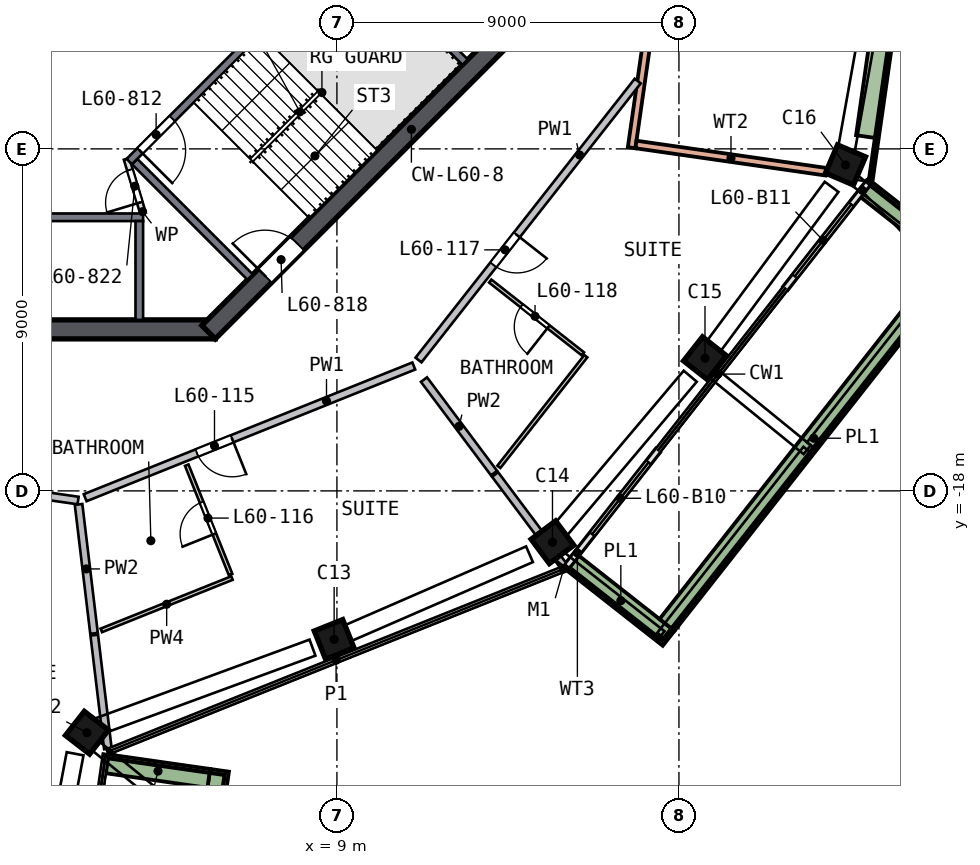
"""IFC4 building model, lengths in metres.
Left out: names, types, materials, properties, quantities, classifications, styles, units other than length and angle.
Written with IfcOpenShell. Run it as: python <this file> out.ifc"""

import sys

from ifc_helpers import new_model, si_unit, direction, frame, frame_2d, origin, origin_2d, place, context, subcontext, project, spatial, rectangle, extrude, element, fill, save


model = new_model("IFC4")
c1 = context("Model", 3, precision=1e-05, world=origin(), true_north=direction((0.0, 1.0)))
c2 = subcontext(c1, "Body", "Model", "MODEL_VIEW")
j1 = project(units=[si_unit("LENGTHUNIT", "METRE"), si_unit("PLANEANGLEUNIT", "RADIAN")], contexts=[c1])
p1 = place(None, origin())
s1 = spatial("IfcSite", under=j1, at=p1, CompositionType="ELEMENT")
p2 = place(p1, origin())
s2 = spatial("IfcBuilding", under=s1, at=p2, CompositionType="ELEMENT")
p3 = place(p2, frame((0.0, 0.0, 244.5)))
s3 = spatial("IfcBuildingStorey", under=s2, at=p3, CompositionType="ELEMENT", Elevation=244.5)
p4 = place(p3, frame((2.283, -24.379, 0.0), z_axis=(0.115845054, 0.011858155, 0.99319651), x_axis=(-0.610285888, -0.788071106, 0.080591978)))
e1 = element("IfcColumn", 1, at=p4, inside=s3, PredefinedType="COLUMN", context=c2, shape_type="SweptSolid", body=[
    extrude(rectangle(XDim=0.8, YDim=0.8, at=origin_2d()), origin(), (0.0, 0.0, 1.0), 3.212),
])
p5 = place(p3, frame((8.801, -21.96, 0.0), z_axis=(0.104110118, 0.042739143, 0.993647044), x_axis=(0.922375739, 0.369538016, -0.11253733)))
e2 = element("IfcColumn", 2, at=p5, inside=s3, PredefinedType="COLUMN", context=c2, shape_type="SweptSolid", body=[
    extrude(rectangle(XDim=0.8, YDim=0.8, at=origin_2d()), origin(), (0.0, 0.0, 1.0), 3.21),
])
p6 = place(p3, frame((14.561, -19.436, 0.0), z_axis=(0.091835145, 0.070016696, 0.993309604), x_axis=(-0.794999833, -0.595516736, 0.11547763)))
e3 = element("IfcColumn", 3, at=p6, inside=s3, PredefinedType="COLUMN", context=c2, shape_type="SweptSolid", body=[
    extrude(rectangle(XDim=0.8, YDim=0.8, at=origin_2d()), origin(), (0.0, 0.0, 1.0), 3.211),
])
p7 = place(p3, frame((18.602, -14.617, 0.0), z_axis=(0.068747968, 0.089052954, 0.993651492), x_axis=(0.613855028, 0.781361755, -0.112498053)))
e4 = element("IfcColumn", 4, at=p7, inside=s3, PredefinedType="COLUMN", context=c2, shape_type="SweptSolid", body=[
    extrude(rectangle(XDim=0.8, YDim=0.8, at=origin_2d()), origin(), (0.0, 0.0, 1.0), 3.21),
])
p8 = place(p3, frame((22.329, -9.552, 0.0), z_axis=(0.044549336, 0.106507884, 0.993313358), x_axis=(-0.391063778, -0.913094462, 0.115445333)))
e5 = element("IfcColumn", 5, at=p8, inside=s3, PredefinedType="COLUMN", context=c2, shape_type="SweptSolid", body=[
    extrude(rectangle(XDim=0.8, YDim=0.8, at=origin_2d()), origin(), (0.0, 0.0, 1.0), 3.211),
])
p9 = place(p3, frame((-5.799, -13.75, 0.0), z_axis=(0.0, 0.0, 1.0), x_axis=(1.0, 0.0, 0.0)))
e6 = element("IfcWall", 6, at=p9, inside=s3, PredefinedType="SHEAR", context=c2, shape_type="SweptSolid", body=[
    extrude(rectangle(XDim=11.598, YDim=0.5, at=frame_2d((5.799, 0.0))), origin(), (0.0, 0.0, 1.0), 3.5),
])
p10 = place(p3, frame((5.622, -13.823, 0.0), z_axis=(0.0, 0.0, 1.0), x_axis=(0.707106781, 0.707106781, 0.0)))
e7 = element("IfcWall", 7, at=p10, inside=s3, PredefinedType="SHEAR", context=c2, shape_type="SweptSolid", body=[
    extrude(rectangle(XDim=11.598, YDim=0.5, at=frame_2d((5.799, 0.0))), origin(), (0.0, 0.0, 1.0), 3.5),
])
p11 = place(p10, frame((2.099, 0.0, 0.0)))
e8 = element("IfcOpeningElement", 8, at=p11, cuts=e7, PredefinedType="OPENING", context=c2, shape_type="SweptSolid", body=[
    extrude(rectangle(XDim=1.2, YDim=2.1, at=frame_2d((0.6, 1.05))), frame((0.0, 0.26, 0.0), z_axis=(0.0, -1.0, 0.0), x_axis=(1.0, 0.0, 0.0)), (0.0, 0.0, 1.0), 0.52),
])
p12 = place(p3, frame((15.061, -19.974, 0.0), z_axis=(0.0, 0.0, 1.0), x_axis=(0.617896909, 0.786259124, 0.0)))
e9 = element("IfcWall", 9, at=p12, inside=s3, PredefinedType="SOLIDWALL", context=c2, shape_type="SweptSolid", body=[
    extrude(rectangle(XDim=3.863, YDim=0.15, at=frame_2d((1.932, 0.0))), origin(), (0.0, 0.0, 1.0), 2.525),
])
p13 = place(p12, frame((1.063, 0.0, 0.0)))
e10 = element("IfcOpeningElement", 10, at=p13, cuts=e9, PredefinedType="OPENING", context=c2, shape_type="SweptSolid", body=[
    extrude(rectangle(XDim=2.4, YDim=2.4, at=frame_2d((1.2, 1.2))), frame((0.0, 0.085, 0.0), z_axis=(0.0, -1.0, 0.0), x_axis=(1.0, 0.0, 0.0)), (0.0, 0.0, 1.0), 0.17),
])
p14 = place(p3, frame((20.804, -12.665, 0.0), z_axis=(0.0, 0.0, 1.0), x_axis=(0.617867182, 0.786282484, 0.0)))
e11 = element("IfcWall", 11, at=p14, inside=s3, PredefinedType="SOLIDWALL", context=c2, shape_type="SweptSolid", body=[
    extrude(rectangle(XDim=3.544, YDim=0.15, at=frame_2d((1.772, 0.0))), origin(), (0.0, 0.0, 1.0), 2.525),
])
p15 = place(p14, frame((0.4, 0.0, 0.0)))
e12 = element("IfcOpeningElement", 12, at=p15, cuts=e11, PredefinedType="OPENING", context=c2, shape_type="SweptSolid", body=[
    extrude(rectangle(XDim=2.4, YDim=2.4, at=frame_2d((1.2, 1.2))), frame((0.0, 0.085, 0.0), z_axis=(0.0, -1.0, 0.0), x_axis=(1.0, 0.0, 0.0)), (0.0, 0.0, 1.0), 0.17),
])
p16 = place(p3, frame((4.504, -35.165, 0.0), z_axis=(0.0, 0.0, 1.0), x_axis=(0.141938642, 0.989875458, 0.0)))
e13 = element("IfcWall", 13, at=p16, inside=s3, PredefinedType="SOLIDWALL", context=c2, shape_type="SweptSolid", body=[
    extrude(rectangle(XDim=9.911, YDim=0.5, at=frame_2d((4.956, 0.0))), origin(), (0.0, 0.0, 1.0), 0.7),
])
p17 = place(p3, frame((5.628, -25.566, 0.0), z_axis=(0.0, 0.0, 1.0), x_axis=(-0.989876998, 0.1419279, 0.0)))
e14 = element("IfcWall", 14, at=p17, inside=s3, PredefinedType="SOLIDWALL", context=c2, shape_type="SweptSolid", body=[
    extrude(rectangle(XDim=2.699, YDim=0.5, at=frame_2d((1.35, 0.0))), origin(), (0.0, 0.0, 1.0), 0.7),
])
p18 = place(p3, frame((15.213, -19.903, 0.0), z_axis=(0.0, 0.0, 1.0), x_axis=(0.786289208, -0.617858626, 0.0)))
e15 = element("IfcWall", 15, at=p18, inside=s3, PredefinedType="SOLIDWALL", context=c2, shape_type="SweptSolid", body=[
    extrude(rectangle(XDim=3.199, YDim=0.5, at=frame_2d((1.6, 0.0))), origin(), (0.0, 0.0, 1.0), 0.7),
])
p19 = place(p3, frame((17.687, -21.529, 0.0), z_axis=(0.0, 0.0, 1.0), x_axis=(0.61785433, 0.786292584, 0.0)))
e16 = element("IfcWall", 16, at=p19, inside=s3, PredefinedType="SOLIDWALL", context=c2, shape_type="SweptSolid", body=[
    extrude(rectangle(XDim=12.5, YDim=0.5, at=frame_2d((6.25, 0.0))), origin(), (0.0, 0.0, 1.0), 0.7),
])
p20 = place(p3, frame((25.059, -11.742, 0.0), z_axis=(0.0, 0.0, 1.0), x_axis=(-0.786249279, 0.617909437, 0.0)))
e17 = element("IfcWall", 17, at=p20, inside=s3, PredefinedType="SOLIDWALL", context=c2, shape_type="SweptSolid", body=[
    extrude(rectangle(XDim=2.699, YDim=0.5, at=frame_2d((1.35, 0.0))), origin(), (0.0, 0.0, 1.0), 0.7),
])
p21 = place(p3, frame((18.6, 3.899, 0.0), z_axis=(0.0, 0.0, 1.0), x_axis=(-0.141939289, -0.989875365, 0.0)))
e18 = element("IfcWall", 18, at=p21, inside=s3, PredefinedType="SOLIDWALL", context=c2, shape_type="SweptSolid", body=[
    extrude(rectangle(XDim=13.0, YDim=0.2, at=frame_2d((6.5, 0.0))), origin(), (0.0, 0.0, 1.0), 3.19),
])
p22 = place(p21, frame((5.6, 0.0, 0.0)))
e19 = element("IfcOpeningElement", 19, at=p22, cuts=e18, PredefinedType="OPENING", context=c2, shape_type="SweptSolid", body=[
    extrude(rectangle(XDim=1.8, YDim=2.4, at=frame_2d((0.9, 1.2))), frame((0.0, 0.11, 0.0), z_axis=(0.0, -1.0, 0.0), x_axis=(1.0, 0.0, 0.0)), (0.0, 0.0, 1.0), 0.22),
])
p23 = place(p3, frame((21.871, -9.602, 0.0), z_axis=(0.0, 0.0, 1.0), x_axis=(-0.989875929, 0.141935358, 0.0)))
e20 = element("IfcWall", 20, at=p23, inside=s3, PredefinedType="SOLIDWALL", context=c2, shape_type="SweptSolid", body=[
    extrude(rectangle(XDim=5.054, YDim=0.2, at=frame_2d((2.527, 0.0))), origin(), (0.0, 0.0, 1.0), 3.19),
])
p24 = place(p3, frame((23.052, -9.791, 0.0), z_axis=(0.0, 0.0, 1.0), x_axis=(0.141940422, 0.989875202, 0.0)))
e21 = element("IfcWall", 21, at=p24, inside=s3, PredefinedType="SOLIDWALL", context=c2, shape_type="SweptSolid", body=[
    extrude(rectangle(XDim=12.84, YDim=0.1, at=frame_2d((6.42, 0.0))), origin(), (0.0, 0.0, 1.0), 0.7),
])
p25 = place(p3, frame((22.909, -8.676, 0.0), z_axis=(0.0, 0.0, 1.0), x_axis=(0.141937197, 0.989875665, 0.0)))
e22 = element("IfcWall", 22, at=p25, inside=s3, PredefinedType="SOLIDWALL", context=c2, shape_type="SweptSolid", body=[
    extrude(rectangle(XDim=4.837, YDim=0.5, at=frame_2d((2.418, 0.0))), origin(), (0.0, 0.0, 1.0), 0.7),
])
p26 = place(p3, frame((-3.9, -10.8, 0.0), z_axis=(0.0, 0.0, 1.0), x_axis=(1.0, 0.0, 0.0)))
e23 = element("IfcWall", 23, at=p26, inside=s3, PredefinedType="SOLIDWALL", context=c2, shape_type="SweptSolid", body=[
    extrude(rectangle(XDim=7.8, YDim=0.2, at=frame_2d((3.9, 0.0))), origin(), (0.0, 0.0, 1.0), 3.19),
])
p27 = place(p26, frame((3.45, 0.0, 0.0)))
e24 = element("IfcOpeningElement", 24, at=p27, cuts=e23, PredefinedType="OPENING", context=c2, shape_type="SweptSolid", body=[
    extrude(rectangle(XDim=0.9, YDim=2.1, at=frame_2d((0.45, 1.05))), frame((0.0, 0.11, 0.0), z_axis=(0.0, -1.0, 0.0), x_axis=(1.0, 0.0, 0.0)), (0.0, 0.0, 1.0), 0.22),
])
p28 = place(p3, frame((3.8, -10.9, 0.0), z_axis=(0.0, 0.0, 1.0), x_axis=(0.0, -1.0, 0.0)))
e25 = element("IfcWall", 25, at=p28, inside=s3, PredefinedType="SOLIDWALL", context=c2, shape_type="SweptSolid", body=[
    extrude(rectangle(XDim=2.6, YDim=0.2, at=frame_2d((1.3, 0.0))), origin(), (0.0, 0.0, 1.0), 3.19),
])
p29 = place(p3, frame((9.629, -3.24, 0.0), z_axis=(0.0, 0.0, 1.0), x_axis=(-0.707120946, -0.707092617, 0.0)))
e26 = element("IfcWall", 26, at=p29, inside=s3, PredefinedType="SOLIDWALL", context=c2, shape_type="SweptSolid", body=[
    extrude(rectangle(XDim=8.618, YDim=0.2, at=frame_2d((4.309, 0.0))), origin(), (0.0, 0.0, 1.0), 3.19),
])
p30 = place(p29, frame((7.018, 0.0, 0.0)))
e27 = element("IfcOpeningElement", 27, at=p30, cuts=e26, PredefinedType="OPENING", context=c2, shape_type="SweptSolid", body=[
    extrude(rectangle(XDim=1.2, YDim=2.1, at=frame_2d((0.6, 1.05))), frame((0.0, 0.11, 0.0), z_axis=(0.0, -1.0, 0.0), x_axis=(1.0, 0.0, 0.0)), (0.0, 0.0, 1.0), 0.22),
])
for number, where, z_axis, x_axis in (
    (28, (3.677, -9.334, 0.0), (0.0, 0.0, 1.0), (0.707, -0.707, 0.0)),
    (29, (9.334, -3.677, 0.0), (0.0, 0.0, 1.0), (0.707, -0.707, 0.0)),
):
    element("IfcWall", number, at=place(p3, frame(where, z_axis=z_axis, x_axis=x_axis)), inside=s3, PredefinedType="SOLIDWALL", context=c2, shape_type="SweptSolid", body=[
        extrude(rectangle(XDim=4.3, YDim=0.2, at=frame_2d((2.15, 0.0))), origin(), (0.0, 0.0, 1.0), 3.19),
    ])
p31 = place(p3, frame((3.9, -10.7, 0.0), z_axis=(0.0, 0.0, 1.0), x_axis=(-0.289808785, 0.957084567, 0.0)))
e30 = element("IfcWall", 30, at=p31, inside=s3, PredefinedType="PARTITIONING", context=c2, shape_type="SweptSolid", body=[
    extrude(rectangle(XDim=1.501, YDim=0.15, at=frame_2d((0.75, 0.0))), origin(), (0.0, 0.0, 1.0), 3.19),
])
p32 = place(p31, frame((0.301, 0.0, 0.0)))
e31 = element("IfcOpeningElement", 31, at=p32, cuts=e30, PredefinedType="OPENING", context=c2, shape_type="SweptSolid", body=[
    extrude(rectangle(XDim=0.9, YDim=2.1, at=frame_2d((0.45, 1.05))), frame((0.0, 0.085, 0.0), z_axis=(0.0, -1.0, 0.0), x_axis=(1.0, 0.0, 0.0)), (0.0, 0.0, 1.0), 0.17),
])
p33 = place(p3, frame((2.19, -18.254, 0.0), z_axis=(0.0, 0.0, 1.0), x_axis=(-0.989873884, 0.141949618, 0.0)))
e32 = element("IfcWall", 32, at=p33, inside=s3, PredefinedType="SOLIDWALL", context=c2, shape_type="SweptSolid", body=[
    extrude(rectangle(XDim=9.317, YDim=0.2, at=frame_2d((4.658, 0.0))), origin(), (0.0, 0.0, 1.0), 3.19),
])
p34 = place(p33, frame((3.881, 0.0, 0.0)))
e33 = element("IfcOpeningElement", 33, at=p34, cuts=e32, PredefinedType="OPENING", context=c2, shape_type="SweptSolid", body=[
    extrude(rectangle(XDim=1.8, YDim=2.1, at=frame_2d((0.9, 1.05))), frame((0.0, 0.11, 0.0), z_axis=(0.0, -1.0, 0.0), x_axis=(1.0, 0.0, 0.0)), (0.0, 0.0, 1.0), 0.22),
])
p35 = place(p3, frame((11.023, -14.714, 0.0), z_axis=(0.0, 0.0, 1.0), x_axis=(-0.928230703, -0.372005055, 0.0)))
e34 = element("IfcWall", 34, at=p35, inside=s3, PredefinedType="SOLIDWALL", context=c2, shape_type="SweptSolid", body=[
    extrude(rectangle(XDim=9.317, YDim=0.2, at=frame_2d((4.658, 0.0))), origin(), (0.0, 0.0, 1.0), 3.19),
])
p36 = place(p35, frame((5.15, 0.0, 0.0)))
e35 = element("IfcOpeningElement", 35, at=p36, cuts=e34, PredefinedType="OPENING", context=c2, shape_type="SweptSolid", body=[
    extrude(rectangle(XDim=1.0, YDim=2.1, at=frame_2d((0.5, 1.05))), frame((0.0, 0.11, 0.0), z_axis=(0.0, -1.0, 0.0), x_axis=(1.0, 0.0, 0.0)), (0.0, 0.0, 1.0), 0.22),
])
p37 = place(p3, frame((16.916, -7.215, 0.0), z_axis=(0.0, 0.0, 1.0), x_axis=(-0.617863125, -0.786285673, 0.0)))
e36 = element("IfcWall", 36, at=p37, inside=s3, PredefinedType="SOLIDWALL", context=c2, shape_type="SweptSolid", body=[
    extrude(rectangle(XDim=9.337, YDim=0.2, at=frame_2d((4.668, 0.0))), origin(), (0.0, 0.0, 1.0), 3.19),
])
p38 = place(p37, frame((5.15, 0.0, 0.0)))
e37 = element("IfcOpeningElement", 37, at=p38, cuts=e36, PredefinedType="OPENING", context=c2, shape_type="SweptSolid", body=[
    extrude(rectangle(XDim=1.0, YDim=2.1, at=frame_2d((0.5, 1.05))), frame((0.0, 0.11, 0.0), z_axis=(0.0, -1.0, 0.0), x_axis=(1.0, 0.0, 0.0)), (0.0, 0.0, 1.0), 0.22),
])
p39 = place(p3, frame((2.202, -18.357, 0.0), z_axis=(0.0, 0.0, 1.0), x_axis=(0.119057916, -0.992887311, 0.0)))
e38 = element("IfcWall", 38, at=p39, inside=s3, PredefinedType="SOLIDWALL", context=c2, shape_type="SweptSolid", body=[
    extrude(rectangle(XDim=3.418, YDim=0.2, at=frame_2d((1.709, 0.0))), origin(), (0.0, 0.0, 1.0), 3.19),
])
p40 = place(p3, frame((2.615, -21.796, 0.0), z_axis=(0.0, 0.0, 1.0), x_axis=(0.119094071, -0.992882975, 0.0)))
e39 = element("IfcWall", 39, at=p40, inside=s3, PredefinedType="SOLIDWALL", context=c2, shape_type="SweptSolid", body=[
    extrude(rectangle(XDim=3.011, YDim=0.2, at=frame_2d((1.506, 0.0))), origin(), (0.0, 0.0, 1.0), 3.19),
])
p41 = place(p3, frame((11.292, -15.072, 0.0), z_axis=(0.0, 0.0, 1.0), x_axis=(0.599580664, -0.800314331, 0.0)))
e40 = element("IfcWall", 40, at=p41, inside=s3, PredefinedType="SOLIDWALL", context=c2, shape_type="SweptSolid", body=[
    extrude(rectangle(XDim=3.075, YDim=0.2, at=frame_2d((1.537, 0.0))), origin(), (0.0, 0.0, 1.0), 3.19),
])
p42 = place(p3, frame((13.162, -17.569, 0.0), z_axis=(0.0, 0.0, 1.0), x_axis=(0.59962375, -0.800282049, 0.0)))
e41 = element("IfcWall", 41, at=p42, inside=s3, PredefinedType="SOLIDWALL", context=c2, shape_type="SweptSolid", body=[
    extrude(rectangle(XDim=3.011, YDim=0.2, at=frame_2d((1.506, 0.0))), origin(), (0.0, 0.0, 1.0), 3.19),
])
p43 = place(p3, frame((6.239, -20.294, 0.0), z_axis=(0.0, 0.0, 1.0), x_axis=(-0.928199139, -0.372083805, 0.0)))
e42 = element("IfcWall", 42, at=p43, inside=s3, PredefinedType="PARTITIONING", context=c2, shape_type="SweptSolid", body=[
    extrude(rectangle(XDim=3.704, YDim=0.1, at=frame_2d((1.852, 0.0))), origin(), (0.0, 0.0, 1.0), 3.19),
])
p44 = place(p3, frame((6.202, -20.201, 0.0), z_axis=(0.0, 0.0, 1.0), x_axis=(-0.372042357, 0.928215753, 0.0)))
e43 = element("IfcWall", 43, at=p44, inside=s3, PredefinedType="PARTITIONING", context=c2, shape_type="SweptSolid", body=[
    extrude(rectangle(XDim=3.1, YDim=0.1, at=frame_2d((1.55, 0.0))), origin(), (0.0, 0.0, 1.0), 3.19),
])
p45 = place(p44, frame((1.15, 0.0, 0.0)))
e44 = element("IfcOpeningElement", 44, at=p45, cuts=e43, PredefinedType="OPENING", context=c2, shape_type="SweptSolid", body=[
    extrude(rectangle(XDim=0.9, YDim=2.1, at=frame_2d((0.45, 1.05))), frame((0.0, 0.06, 0.0), z_axis=(0.0, -1.0, 0.0), x_axis=(1.0, 0.0, 0.0)), (0.0, 0.0, 1.0), 0.12),
])
p46 = place(p3, frame((15.471, -14.394, 0.0), z_axis=(0.0, 0.0, 1.0), x_axis=(-0.786301941, 0.617842421, 0.0)))
e45 = element("IfcWall", 45, at=p46, inside=s3, PredefinedType="PARTITIONING", context=c2, shape_type="SweptSolid", body=[
    extrude(rectangle(XDim=3.1, YDim=0.1, at=frame_2d((1.55, 0.0))), origin(), (0.0, 0.0, 1.0), 3.19),
])
p47 = place(p46, frame((1.15, 0.0, 0.0)))
e46 = element("IfcOpeningElement", 46, at=p47, cuts=e45, PredefinedType="OPENING", context=c2, shape_type="SweptSolid", body=[
    extrude(rectangle(XDim=0.9, YDim=2.1, at=frame_2d((0.45, 1.05))), frame((0.0, 0.06, 0.0), z_axis=(0.0, -1.0, 0.0), x_axis=(1.0, 0.0, 0.0)), (0.0, 0.0, 1.0), 0.12),
])
p48 = place(p3, frame((15.55, -14.455, 0.0), z_axis=(0.0, 0.0, 1.0), x_axis=(-0.617798264, -0.786336636, 0.0)))
e47 = element("IfcWall", 47, at=p48, inside=s3, PredefinedType="PARTITIONING", context=c2, shape_type="SweptSolid", body=[
    extrude(rectangle(XDim=3.704, YDim=0.1, at=frame_2d((1.852, 0.0))), origin(), (0.0, 0.0, 1.0), 3.19),
])
p49 = place(p13, origin())
e48 = element("IfcDoor", 48, at=p49, inside=s3, OperationType="SLIDING_TO_LEFT", PredefinedType="DOOR", context=c2, shape_type="SweptSolid", body=[
    extrude(rectangle(XDim=2.4, YDim=2.4, at=frame_2d((1.2, 1.2))), frame((0.0, 0.025, 0.0), z_axis=(0.0, -1.0, 0.0), x_axis=(1.0, 0.0, 0.0)), (0.0, 0.0, 1.0), 0.05),
])
fill(e10, e48)
p50 = place(p15, origin())
e49 = element("IfcDoor", 49, at=p50, inside=s3, OperationType="SLIDING_TO_RIGHT", PredefinedType="DOOR", context=c2, shape_type="SweptSolid", body=[
    extrude(rectangle(XDim=2.4, YDim=2.4, at=frame_2d((1.2, 1.2))), frame((0.0, 0.025, 0.0), z_axis=(0.0, -1.0, 0.0), x_axis=(1.0, 0.0, 0.0)), (0.0, 0.0, 1.0), 0.05),
])
fill(e12, e49)
p51 = place(p30, origin())
e50 = element("IfcDoor", 50, at=p51, inside=s3, OperationType="SINGLE_SWING_RIGHT", PredefinedType="DOOR", context=c2, shape_type="SweptSolid", body=[
    extrude(rectangle(XDim=1.2, YDim=2.1, at=frame_2d((0.6, 1.05))), frame((0.0, 0.025, 0.0), z_axis=(0.0, -1.0, 0.0), x_axis=(1.0, 0.0, 0.0)), (0.0, 0.0, 1.0), 0.05),
])
fill(e27, e50)
p52 = place(p11, origin())
e51 = element("IfcDoor", 51, at=p52, inside=s3, OperationType="SINGLE_SWING_LEFT", PredefinedType="DOOR", context=c2, shape_type="SweptSolid", body=[
    extrude(rectangle(XDim=1.2, YDim=2.1, at=frame_2d((0.6, 1.05))), frame((0.0, 0.025, 0.0), z_axis=(0.0, -1.0, 0.0), x_axis=(1.0, 0.0, 0.0)), (0.0, 0.0, 1.0), 0.05),
])
fill(e8, e51)
p53 = place(p32, origin())
e52 = element("IfcDoor", 52, at=p53, inside=s3, OperationType="SINGLE_SWING_LEFT", PredefinedType="DOOR", context=c2, shape_type="SweptSolid", body=[
    extrude(rectangle(XDim=0.9, YDim=2.1, at=frame_2d((0.45, 1.05))), frame((0.0, 0.025, 0.0), z_axis=(0.0, -1.0, 0.0), x_axis=(1.0, 0.0, 0.0)), (0.0, 0.0, 1.0), 0.05),
])
fill(e31, e52)
p54 = place(p36, origin())
e53 = element("IfcDoor", 53, at=p54, inside=s3, OperationType="SINGLE_SWING_LEFT", PredefinedType="DOOR", context=c2, shape_type="SweptSolid", body=[
    extrude(rectangle(XDim=1.0, YDim=2.1, at=frame_2d((0.5, 1.05))), frame((0.0, 0.025, 0.0), z_axis=(0.0, -1.0, 0.0), x_axis=(1.0, 0.0, 0.0)), (0.0, 0.0, 1.0), 0.05),
])
fill(e35, e53)
p55 = place(p45, origin())
e54 = element("IfcDoor", 54, at=p55, inside=s3, OperationType="SINGLE_SWING_LEFT", PredefinedType="DOOR", context=c2, shape_type="SweptSolid", body=[
    extrude(rectangle(XDim=0.9, YDim=2.1, at=frame_2d((0.45, 1.05))), frame((0.0, 0.025, 0.0), z_axis=(0.0, -1.0, 0.0), x_axis=(1.0, 0.0, 0.0)), (0.0, 0.0, 1.0), 0.05),
])
fill(e44, e54)
p56 = place(p38, origin())
e55 = element("IfcDoor", 55, at=p56, inside=s3, OperationType="SINGLE_SWING_LEFT", PredefinedType="DOOR", context=c2, shape_type="SweptSolid", body=[
    extrude(rectangle(XDim=1.0, YDim=2.1, at=frame_2d((0.5, 1.05))), frame((0.0, 0.025, 0.0), z_axis=(0.0, -1.0, 0.0), x_axis=(1.0, 0.0, 0.0)), (0.0, 0.0, 1.0), 0.05),
])
fill(e37, e55)
p57 = place(p47, origin())
e56 = element("IfcDoor", 56, at=p57, inside=s3, OperationType="SINGLE_SWING_LEFT", PredefinedType="DOOR", context=c2, shape_type="SweptSolid", body=[
    extrude(rectangle(XDim=0.9, YDim=2.1, at=frame_2d((0.45, 1.05))), frame((0.0, 0.025, 0.0), z_axis=(0.0, -1.0, 0.0), x_axis=(1.0, 0.0, 0.0)), (0.0, 0.0, 1.0), 0.05),
])
fill(e46, e56)
save(model, sys.argv[1])
